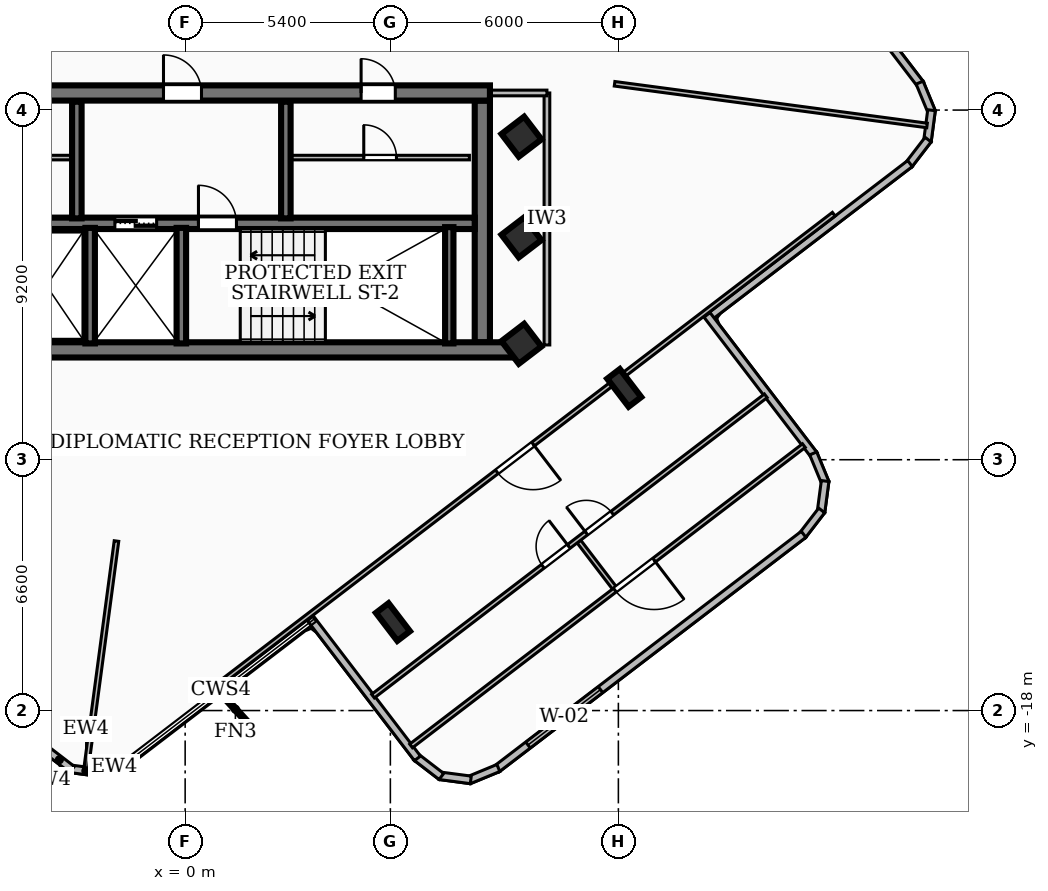
"""IFC4 building model, lengths in metres.
Left out: names, types, materials, properties, quantities, classifications, styles, units other than length and angle.
Written with IfcOpenShell. Run it as: python <this file> out.ifc"""

import sys

from ifc_helpers import new_model, si_unit, direction, frame, frame_2d, origin, origin_2d, place, context, subcontext, project, spatial, rectangle, i_section, extrude, element, fill, save


model = new_model("IFC4")
c1 = context("Model", 3, precision=1e-05, world=origin(), true_north=direction((0.0, 1.0)))
c2 = subcontext(c1, "Body", "Model", "MODEL_VIEW")
j1 = project(units=[si_unit("LENGTHUNIT", "METRE"), si_unit("PLANEANGLEUNIT", "RADIAN")], contexts=[c1])
p1 = place(None, origin())
s1 = spatial("IfcSite", under=j1, at=p1, CompositionType="ELEMENT")
p2 = place(p1, origin())
s2 = spatial("IfcBuilding", under=s1, at=p2, CompositionType="ELEMENT")
p3 = place(p2, frame((0.0, 0.0, 229.14)))
s3 = spatial("IfcBuildingStorey", under=s2, at=p3, CompositionType="ELEMENT", Elevation=229.14)
p4 = place(p3, frame((8.78, -8.51, 0.0), z_axis=(0.0, 0.0, 1.0), x_axis=(-1.0, 0.0, 0.0)))
e1 = element("IfcWall", 1, at=p4, inside=s3, PredefinedType="SHEAR", context=c2, shape_type="SweptSolid", body=[
    extrude(rectangle(XDim=17.56, YDim=0.4, at=frame_2d((8.78, 0.0))), origin(), (0.0, 0.0, 1.0), 3.14),
])
p5 = place(p3, frame((-8.02, -1.75, 0.0), z_axis=(0.0, 0.0, 1.0), x_axis=(1.0, 0.0, 0.0)))
e2 = element("IfcWall", 2, at=p5, inside=s3, PredefinedType="SHEAR", context=c2, shape_type="SweptSolid", body=[
    extrude(rectangle(XDim=16.04, YDim=0.4, at=frame_2d((8.02, 0.0))), origin(), (0.0, 0.0, 1.0), 3.14),
])
p6 = place(p5, frame((7.45, 0.0, 0.0)))
e3 = element("IfcOpeningElement", 3, at=p6, cuts=e2, PredefinedType="OPENING", context=c2, shape_type="SweptSolid", body=[
    extrude(rectangle(XDim=1.0, YDim=2.1, at=frame_2d((0.5, 1.05))), frame((0.0, 0.21, 0.0), z_axis=(0.0, -1.0, 0.0), x_axis=(1.0, 0.0, 0.0)), (0.0, 0.0, 1.0), 0.42),
])
p7 = place(p5, frame((12.65, 0.0, 0.0)))
e4 = element("IfcOpeningElement", 4, at=p7, cuts=e2, PredefinedType="OPENING", context=c2, shape_type="SweptSolid", body=[
    extrude(rectangle(XDim=0.9, YDim=2.06, at=frame_2d((0.45, 1.03))), frame((0.0, 0.21, 0.0), z_axis=(0.0, -1.0, 0.0), x_axis=(1.0, 0.0, 0.0)), (0.0, 0.0, 1.0), 0.42),
])
p8 = place(p5, frame((2.25, 0.0, 0.0)))
e5 = element("IfcOpeningElement", 5, at=p8, cuts=e2, PredefinedType="OPENING", context=c2, shape_type="SweptSolid", body=[
    extrude(rectangle(XDim=0.9, YDim=2.06, at=frame_2d((0.45, 1.03))), frame((0.0, 0.21, 0.0), z_axis=(0.0, -1.0, 0.0), x_axis=(1.0, 0.0, 0.0)), (0.0, 0.0, 1.0), 0.42),
])
p9 = place(p3, frame((7.82, -1.95, 0.0), z_axis=(0.0, 0.0, 1.0), x_axis=(0.0, -1.0, 0.0)))
e6 = element("IfcWall", 6, at=p9, inside=s3, PredefinedType="SHEAR", context=c2, shape_type="SweptSolid", body=[
    extrude(rectangle(XDim=6.36, YDim=0.4, at=frame_2d((3.18, 0.0))), origin(), (0.0, 0.0, 1.0), 3.14),
])
p10 = place(p3, frame((-7.62, -5.18, 0.0), z_axis=(0.0, 0.0, 1.0), x_axis=(1.0, 0.0, 0.0)))
e7 = element("IfcWall", 7, at=p10, inside=s3, PredefinedType="SOLIDWALL", context=c2, shape_type="SweptSolid", body=[
    extrude(rectangle(XDim=15.24, YDim=0.3, at=frame_2d((7.62, 0.0))), origin(), (0.0, 0.0, 1.0), 3.14),
])
p11 = place(p10, frame((5.77, 0.0, 0.0)))
e8 = element("IfcOpeningElement", 8, at=p11, cuts=e7, PredefinedType="OPENING", context=c2, shape_type="SweptSolid", body=[
    extrude(rectangle(XDim=1.1, YDim=2.15, at=frame_2d((0.55, 1.075))), frame((0.0, 0.16, 0.0), z_axis=(0.0, -1.0, 0.0), x_axis=(1.0, 0.0, 0.0)), (0.0, 0.0, 1.0), 0.32),
])
p12 = place(p10, frame((7.97, 0.0, 0.0)))
e9 = element("IfcOpeningElement", 9, at=p12, cuts=e7, PredefinedType="OPENING", context=c2, shape_type="SweptSolid", body=[
    extrude(rectangle(XDim=1.0, YDim=2.1, at=frame_2d((0.5, 1.05))), frame((0.0, 0.16, 0.0), z_axis=(0.0, -1.0, 0.0), x_axis=(1.0, 0.0, 0.0)), (0.0, 0.0, 1.0), 0.32),
])
p13 = place(p3, frame((6.95, -8.34, 0.0), z_axis=(0.0, 0.0, 1.0), x_axis=(0.0, 1.0, 0.0)))
e10 = element("IfcWall", 10, at=p13, inside=s3, PredefinedType="SOLIDWALL", context=c2, shape_type="SweptSolid", body=[
    extrude(rectangle(XDim=3.06, YDim=0.22, at=frame_2d((1.53, 0.0))), origin(), (0.0, 0.0, 1.0), 3.14),
])
for number, where, z_axis, x_axis in (
    (11, (-0.1, -8.34, 0.0), (0.0, 0.0, 1.0), (0.0, 1.0, 0.0)),
    (12, (-2.5, -8.34, 0.0), (0.0, 0.0, 1.0), (0.0, 1.0, 0.0)),
):
    element("IfcWall", number, at=place(p3, frame(where, z_axis=z_axis, x_axis=x_axis)), inside=s3, PredefinedType="SOLIDWALL", context=c2, shape_type="SweptSolid", body=[
        extrude(rectangle(XDim=3.04, YDim=0.25, at=frame_2d((1.52, 0.0))), origin(), (0.0, 0.0, 1.0), 3.14),
    ])
for number, where, z_axis, x_axis in (
    (13, (-2.85, -5.05, 0.0), (0.0, 0.0, 1.0), (0.0, 1.0, 0.0)),
    (14, (2.65, -5.05, 0.0), (0.0, 0.0, 1.0), (0.0, 1.0, 0.0)),
):
    element("IfcWall", number, at=place(p3, frame(where, z_axis=z_axis, x_axis=x_axis)), inside=s3, PredefinedType="SOLIDWALL", context=c2, shape_type="SweptSolid", body=[
        extrude(rectangle(XDim=3.07, YDim=0.25, at=frame_2d((1.535, 0.0))), origin(), (0.0, 0.0, 1.0), 3.14),
    ])
for number, where, z_axis, x_axis in (
    (15, (8.85, -5.55, 0.0), (0.0, 0.0, 1.0), (0.794, 0.607, 0.0)),
    (16, (8.85, -2.9, 0.0), (0.0, 0.0, 1.0), (0.794, 0.607, 0.0)),
    (17, (8.85, -8.35, 0.0), (0.0, 0.0, 1.0), (0.794, 0.607, 0.0)),
):
    element("IfcColumn", number, at=place(p3, frame(where, z_axis=z_axis, x_axis=x_axis)), inside=s3, PredefinedType="COLUMN", context=c2, shape_type="SweptSolid", body=[
        extrude(rectangle(XDim=0.75, YDim=0.75, at=origin_2d()), origin(), (0.0, 0.0, 1.0), 3.42),
    ])
for number, where, z_axis, x_axis in (
    (18, (5.468, -15.671, 0.0), (0.0, 0.0, 1.0), (0.794, 0.607, 0.0)),
    (19, (11.554, -9.51, 0.0), (0.0, 0.0, 1.0), (0.794, 0.607, 0.0)),
):
    element("IfcColumn", number, at=place(p3, frame(where, z_axis=z_axis, x_axis=x_axis)), inside=s3, PredefinedType="COLUMN", context=c2, shape_type="SweptSolid", body=[
        extrude(i_section(OverallWidth=0.418, OverallDepth=0.927, WebThickness=0.019, FlangeThickness=0.032, at=origin_2d()), origin(), (0.0, 0.0, 1.0), 3.42),
    ])
p14 = place(p3, frame((-1.478, -19.327, 0.0), z_axis=(0.0, 0.0, 1.0), x_axis=(-0.924091394431, -0.382171551451, 0.0)))
e20 = element("IfcWall", 20, at=p14, inside=s3, PredefinedType="SOLIDWALL", context=c2, shape_type="SweptSolid", body=[
    extrude(rectangle(XDim=0.837, YDim=0.2, at=frame_2d((0.419, 0.0))), origin(), (0.0, 0.0, 1.0), 3.14),
])
p15 = place(p3, frame((-2.204, -19.64, 0.0), z_axis=(0.0, 0.0, 1.0), x_axis=(-0.99140789753, 0.130806653943, 0.0)))
e21 = element("IfcWall", 21, at=p15, inside=s3, PredefinedType="SOLIDWALL", context=c2, shape_type="SweptSolid", body=[
    extrude(rectangle(XDim=0.825, YDim=0.2, at=frame_2d((0.413, 0.0))), origin(), (0.0, 0.0, 1.0), 3.14),
])
p16 = place(p3, frame((-2.977, -19.55, 0.0), z_axis=(0.0, 0.0, 1.0), x_axis=(-0.792959338773, 0.609274558022, 0.0)))
e22 = element("IfcWall", 22, at=p16, inside=s3, PredefinedType="SOLIDWALL", context=c2, shape_type="SweptSolid", body=[
    extrude(rectangle(XDim=0.839, YDim=0.2, at=frame_2d((0.419, 0.0))), origin(), (0.0, 0.0, 1.0), 3.14),
])
p17 = place(p3, frame((15.584, 3.406, 0.0), z_axis=(0.0, 0.0, 1.0), x_axis=(0.60748663121, -0.794329901805, 0.0)))
e23 = element("IfcWall", 23, at=p17, inside=s3, PredefinedType="SOLIDWALL", context=c2, shape_type="SweptSolid", body=[
    extrude(rectangle(XDim=6.203, YDim=0.2, at=frame_2d((3.101, 0.0))), origin(), (0.0, 0.0, 1.0), 3.14),
])
p18 = place(p3, frame((19.327, -1.478, 0.0), z_axis=(0.0, 0.0, 1.0), x_axis=(0.382171551451, -0.924091394431, 0.0)))
e24 = element("IfcWall", 24, at=p18, inside=s3, PredefinedType="SOLIDWALL", context=c2, shape_type="SweptSolid", body=[
    extrude(rectangle(XDim=0.837, YDim=0.2, at=frame_2d((0.419, 0.0))), origin(), (0.0, 0.0, 1.0), 3.14),
])
p19 = place(p3, frame((19.64, -2.204, 0.0), z_axis=(0.0, 0.0, 1.0), x_axis=(-0.130806653943, -0.99140789753, 0.0)))
e25 = element("IfcWall", 25, at=p19, inside=s3, PredefinedType="SOLIDWALL", context=c2, shape_type="SweptSolid", body=[
    extrude(rectangle(XDim=0.825, YDim=0.2, at=frame_2d((0.413, 0.0))), origin(), (0.0, 0.0, 1.0), 3.14),
])
p20 = place(p3, frame((19.55, -2.977, 0.0), z_axis=(0.0, 0.0, 1.0), x_axis=(-0.609274558022, -0.792959338773, 0.0)))
e26 = element("IfcWall", 26, at=p20, inside=s3, PredefinedType="SOLIDWALL", context=c2, shape_type="SweptSolid", body=[
    extrude(rectangle(XDim=0.839, YDim=0.2, at=frame_2d((0.419, 0.0))), origin(), (0.0, 0.0, 1.0), 3.14),
])
p21 = place(p3, frame((19.074, -3.607, 0.0), z_axis=(0.0, 0.0, 1.0), x_axis=(-0.794465731546, -0.607308983466, 0.0)))
e27 = element("IfcWall", 27, at=p21, inside=s3, PredefinedType="SOLIDWALL", context=c2, shape_type="SweptSolid", body=[
    extrude(rectangle(XDim=6.743, YDim=0.2, at=frame_2d((3.372, 0.0))), origin(), (0.0, 0.0, 1.0), 3.14),
])
p22 = place(p3, frame((13.732, -7.589, 0.0), z_axis=(0.0, 0.0, 1.0), x_axis=(0.607428636372, -0.794374251669, 0.0)))
e28 = element("IfcWall", 28, at=p22, inside=s3, PredefinedType="SOLIDWALL", context=c2, shape_type="SweptSolid", body=[
    extrude(rectangle(XDim=4.643, YDim=0.2, at=frame_2d((2.321, 0.0))), origin(), (0.0, 0.0, 1.0), 3.14),
])
p23 = place(p3, frame((16.527, -11.234, 0.0), z_axis=(0.0, 0.0, 1.0), x_axis=(0.381408676087, -0.924406524104, 0.0)))
e29 = element("IfcWall", 29, at=p23, inside=s3, PredefinedType="SOLIDWALL", context=c2, shape_type="SweptSolid", body=[
    extrude(rectangle(XDim=0.839, YDim=0.2, at=frame_2d((0.419, 0.0))), origin(), (0.0, 0.0, 1.0), 3.14),
])
p24 = place(p3, frame((16.84, -11.961, 0.0), z_axis=(0.0, 0.0, 1.0), x_axis=(-0.131059066172, -0.991374561492, 0.0)))
e30 = element("IfcWall", 30, at=p24, inside=s3, PredefinedType="SOLIDWALL", context=c2, shape_type="SweptSolid", body=[
    extrude(rectangle(XDim=0.825, YDim=0.2, at=frame_2d((0.413, 0.0))), origin(), (0.0, 0.0, 1.0), 3.14),
])
p25 = place(p3, frame((16.75, -12.734, 0.0), z_axis=(0.0, 0.0, 1.0), x_axis=(-0.609837482774, -0.792526494575, 0.0)))
e31 = element("IfcWall", 31, at=p25, inside=s3, PredefinedType="SOLIDWALL", context=c2, shape_type="SweptSolid", body=[
    extrude(rectangle(XDim=0.838, YDim=0.2, at=frame_2d((0.419, 0.0))), origin(), (0.0, 0.0, 1.0), 3.14),
])
p26 = place(p3, frame((16.274, -13.363, 0.0), z_axis=(0.0, 0.0, 1.0), x_axis=(-0.794458044917, -0.607319038781, 0.0)))
e32 = element("IfcWall", 32, at=p26, inside=s3, PredefinedType="SOLIDWALL", context=c2, shape_type="SweptSolid", body=[
    extrude(rectangle(XDim=10.164, YDim=0.2, at=frame_2d((5.082, 0.0))), origin(), (0.0, 0.0, 1.0), 3.14),
])
p27 = place(p26, frame((6.728, 0.0, 0.85)))
e33 = element("IfcOpeningElement", 33, at=p27, cuts=e32, PredefinedType="OPENING", context=c2, shape_type="SweptSolid", body=[
    extrude(rectangle(XDim=2.4, YDim=2.1, at=frame_2d((1.2, 1.05))), frame((0.0, 0.11, 0.0), z_axis=(0.0, -1.0, 0.0), x_axis=(1.0, 0.0, 0.0)), (0.0, 0.0, 1.0), 0.22),
])
p28 = place(p3, frame((8.242, -19.511, 0.0), z_axis=(0.0, 0.0, 1.0), x_axis=(-0.924091394431, -0.382171551451, 0.0)))
e34 = element("IfcWall", 34, at=p28, inside=s3, PredefinedType="SOLIDWALL", context=c2, shape_type="SweptSolid", body=[
    extrude(rectangle(XDim=0.837, YDim=0.2, at=frame_2d((0.419, 0.0))), origin(), (0.0, 0.0, 1.0), 3.14),
])
p29 = place(p3, frame((7.516, -19.824, 0.0), z_axis=(0.0, 0.0, 1.0), x_axis=(-0.991412958994, 0.130768286444, 0.0)))
e35 = element("IfcWall", 35, at=p29, inside=s3, PredefinedType="SOLIDWALL", context=c2, shape_type="SweptSolid", body=[
    extrude(rectangle(XDim=0.825, YDim=0.2, at=frame_2d((0.413, 0.0))), origin(), (0.0, 0.0, 1.0), 3.14),
])
p30 = place(p3, frame((6.743, -19.734, 0.0), z_axis=(0.0, 0.0, 1.0), x_axis=(-0.792959338773, 0.609274558022, 0.0)))
e36 = element("IfcWall", 36, at=p30, inside=s3, PredefinedType="SOLIDWALL", context=c2, shape_type="SweptSolid", body=[
    extrude(rectangle(XDim=0.839, YDim=0.2, at=frame_2d((0.419, 0.0))), origin(), (0.0, 0.0, 1.0), 3.14),
])
p31 = place(p3, frame((6.113, -19.258, 0.0), z_axis=(0.0, 0.0, 1.0), x_axis=(-0.607327150699, 0.794451843741, 0.0)))
e37 = element("IfcWall", 37, at=p31, inside=s3, PredefinedType="SOLIDWALL", context=c2, shape_type="SweptSolid", body=[
    extrude(rectangle(XDim=4.643, YDim=0.2, at=frame_2d((2.322, 0.0))), origin(), (0.0, 0.0, 1.0), 3.14),
])
p32 = place(p3, frame((2.8, -3.45, 0.0), z_axis=(0.0, 0.0, 1.0), x_axis=(1.0, 0.0, 0.0)))
e38 = element("IfcWall", 38, at=p32, inside=s3, PredefinedType="PARTITIONING", context=c2, shape_type="SweptSolid", body=[
    extrude(rectangle(XDim=4.68, YDim=0.12, at=frame_2d((2.34, 0.0))), origin(), (0.0, 0.0, 1.0), 3.14),
])
p33 = place(p32, frame((1.9, 0.0, 0.0)))
e39 = element("IfcOpeningElement", 39, at=p33, cuts=e38, PredefinedType="OPENING", context=c2, shape_type="SweptSolid", body=[
    extrude(rectangle(XDim=0.86, YDim=2.04, at=frame_2d((0.43, 1.02))), frame((0.0, 0.07, 0.0), z_axis=(0.0, -1.0, 0.0), x_axis=(1.0, 0.0, 0.0)), (0.0, 0.0, 1.0), 0.14),
])
p34 = place(p3, frame((-7.52, -3.45, 0.0), z_axis=(0.0, 0.0, 1.0), x_axis=(1.0, 0.0, 0.0)))
e40 = element("IfcWall", 40, at=p34, inside=s3, PredefinedType="PARTITIONING", context=c2, shape_type="SweptSolid", body=[
    extrude(rectangle(XDim=4.54, YDim=0.12, at=frame_2d((2.27, 0.0))), origin(), (0.0, 0.0, 1.0), 3.14),
])
p35 = place(p34, frame((1.84, 0.0, 0.0)))
e41 = element("IfcOpeningElement", 41, at=p35, cuts=e40, PredefinedType="OPENING", context=c2, shape_type="SweptSolid", body=[
    extrude(rectangle(XDim=0.86, YDim=2.04, at=frame_2d((0.43, 1.02))), frame((0.0, 0.07, 0.0), z_axis=(0.0, -1.0, 0.0), x_axis=(1.0, 0.0, 0.0)), (0.0, 0.0, 1.0), 0.14),
])
p36 = place(p3, frame((9.52, -8.38, 0.0), z_axis=(0.0, 0.0, 1.0), x_axis=(0.0, 1.0, 0.0)))
e42 = element("IfcWall", 42, at=p36, inside=s3, PredefinedType="PARTITIONING", context=c2, shape_type="SweptSolid", body=[
    extrude(rectangle(XDim=6.63, YDim=0.15, at=frame_2d((3.315, 0.0))), origin(), (0.0, 0.0, 1.0), 3.14),
])
p37 = place(p3, frame((7.85, -1.75, 0.0), z_axis=(0.0, 0.0, 1.0), x_axis=(1.0, 0.0, 0.0)))
e43 = element("IfcWall", 43, at=p37, inside=s3, PredefinedType="PARTITIONING", context=c2, shape_type="SweptSolid", body=[
    extrude(rectangle(XDim=1.67, YDim=0.15, at=frame_2d((0.835, 0.0))), origin(), (0.0, 0.0, 1.0), 2.37),
])
p38 = place(p3, frame((-1.807, -13.54, 0.0), z_axis=(0.0, 0.0, 1.0), x_axis=(-0.132245865303, -0.991216944523, 0.0)))
e44 = element("IfcWall", 44, at=p38, inside=s3, PredefinedType="PARTITIONING", context=c2, shape_type="SweptSolid", body=[
    extrude(rectangle(XDim=6.035, YDim=0.12, at=frame_2d((3.018, 0.0))), origin(), (0.0, 0.0, 1.0), 3.14),
])
p39 = place(p3, frame((11.3, -1.508, 0.0), z_axis=(0.0, 0.0, 1.0), x_axis=(0.99121735818, -0.132242764804, 0.0)))
e45 = element("IfcWall", 45, at=p39, inside=s3, PredefinedType="PARTITIONING", context=c2, shape_type="SweptSolid", body=[
    extrude(rectangle(XDim=8.295, YDim=0.12, at=frame_2d((4.147, 0.0))), origin(), (0.0, 0.0, 1.0), 3.14),
])
p40 = place(p3, frame((17.068, -4.939, 0.0), z_axis=(0.0, 0.0, 1.0), x_axis=(-0.794433927634, -0.607350586255, 0.0)))
e46 = element("IfcWall", 46, at=p40, inside=s3, PredefinedType="PARTITIONING", context=c2, shape_type="SweptSolid", body=[
    extrude(rectangle(XDim=20.58, YDim=0.12, at=frame_2d((10.29, 0.0))), origin(), (0.0, 0.0, 1.0), 2.51),
])
p41 = place(p40, frame((9.96, 0.0, 0.0)))
e47 = element("IfcOpeningElement", 47, at=p41, cuts=e46, PredefinedType="OPENING", context=c2, shape_type="SweptSolid", body=[
    extrude(rectangle(XDim=1.2, YDim=2.1, at=frame_2d((0.6, 1.05))), frame((0.0, 0.07, 0.0), z_axis=(0.0, -1.0, 0.0), x_axis=(1.0, 0.0, 0.0)), (0.0, 0.0, 1.0), 0.14),
])
p42 = place(p3, frame((10.362, -13.553, 0.0), z_axis=(0.0, 0.0, 1.0), x_axis=(0.6073553069, -0.794430318644, 0.0)))
e48 = element("IfcWall", 48, at=p42, inside=s3, PredefinedType="PARTITIONING", context=c2, shape_type="SweptSolid", body=[
    extrude(rectangle(XDim=1.53, YDim=0.12, at=frame_2d((0.765, 0.0))), origin(), (0.0, 0.0, 1.0), 3.14),
])
p43 = place(p3, frame((4.943, -17.62, 0.0), z_axis=(0.0, 0.0, 1.0), x_axis=(0.79442653656, 0.607360253893, 0.0)))
e49 = element("IfcWall", 49, at=p43, inside=s3, PredefinedType="PARTITIONING", context=c2, shape_type="SweptSolid", body=[
    extrude(rectangle(XDim=13.01, YDim=0.12, at=frame_2d((6.505, 0.0))), origin(), (0.0, 0.0, 1.0), 3.14),
])
p44 = place(p43, frame((5.625, 0.0, 0.0)))
e50 = element("IfcOpeningElement", 50, at=p44, cuts=e49, PredefinedType="OPENING", context=c2, shape_type="SweptSolid", body=[
    extrude(rectangle(XDim=0.86, YDim=2.04, at=frame_2d((0.43, 1.02))), frame((0.0, 0.07, 0.0), z_axis=(0.0, -1.0, 0.0), x_axis=(1.0, 0.0, 0.0)), (0.0, 0.0, 1.0), 0.14),
])
p45 = place(p43, frame((7.065, 0.0, 0.0)))
e51 = element("IfcOpeningElement", 51, at=p45, cuts=e49, PredefinedType="OPENING", context=c2, shape_type="SweptSolid", body=[
    extrude(rectangle(XDim=0.86, YDim=2.04, at=frame_2d((0.43, 1.02))), frame((0.0, 0.07, 0.0), z_axis=(0.0, -1.0, 0.0), x_axis=(1.0, 0.0, 0.0)), (0.0, 0.0, 1.0), 0.14),
])
p46 = place(p3, frame((16.281, -11.029, 0.0), z_axis=(0.0, 0.0, 1.0), x_axis=(-0.794435590649, -0.607348410973, 0.0)))
e52 = element("IfcWall", 52, at=p46, inside=s3, PredefinedType="PARTITIONING", context=c2, shape_type="SweptSolid", body=[
    extrude(rectangle(XDim=13.01, YDim=0.12, at=frame_2d((6.505, 0.0))), origin(), (0.0, 0.0, 1.0), 3.14),
])
p47 = place(p46, frame((4.96, 0.0, 0.0)))
e53 = element("IfcOpeningElement", 53, at=p47, cuts=e52, PredefinedType="OPENING", context=c2, shape_type="SweptSolid", body=[
    extrude(rectangle(XDim=1.3, YDim=2.1, at=frame_2d((0.65, 1.05))), frame((0.0, 0.07, 0.0), z_axis=(0.0, -1.0, 0.0), x_axis=(1.0, 0.0, 0.0)), (0.0, 0.0, 1.0), 0.14),
])
p48 = place(p27, origin())
e54 = element("IfcWindow", 54, at=p48, inside=s3, PartitioningType="SINGLE_PANEL", PredefinedType="WINDOW", context=c2, shape_type="SweptSolid", body=[
    extrude(rectangle(XDim=2.4, YDim=2.1, at=frame_2d((1.2, 1.05))), frame((0.0, 0.03, 0.0), z_axis=(0.0, -1.0, 0.0), x_axis=(1.0, 0.0, 0.0)), (0.0, 0.0, 1.0), 0.06),
])
fill(e33, e54)
p49 = place(p6, origin())
e55 = element("IfcDoor", 55, at=p49, inside=s3, OperationType="SINGLE_SWING_LEFT", PredefinedType="DOOR", context=c2, shape_type="SweptSolid", body=[
    extrude(rectangle(XDim=1.0, YDim=2.1, at=frame_2d((0.5, 1.05))), frame((0.0, 0.025, 0.0), z_axis=(0.0, -1.0, 0.0), x_axis=(1.0, 0.0, 0.0)), (0.0, 0.0, 1.0), 0.05),
])
fill(e3, e55)
p50 = place(p11, origin())
e56 = element("IfcDoor", 56, at=p50, inside=s3, OperationType="DOUBLE_DOOR_SLIDING", PredefinedType="DOOR", context=c2, shape_type="SweptSolid", body=[
    extrude(rectangle(XDim=1.1, YDim=2.15, at=frame_2d((0.55, 1.075))), frame((0.0, 0.025, 0.0), z_axis=(0.0, -1.0, 0.0), x_axis=(1.0, 0.0, 0.0)), (0.0, 0.0, 1.0), 0.05),
])
fill(e8, e56)
p51 = place(p12, origin())
e57 = element("IfcDoor", 57, at=p51, inside=s3, OperationType="SINGLE_SWING_LEFT", PredefinedType="DOOR", context=c2, shape_type="SweptSolid", body=[
    extrude(rectangle(XDim=1.0, YDim=2.1, at=frame_2d((0.5, 1.05))), frame((0.0, 0.025, 0.0), z_axis=(0.0, -1.0, 0.0), x_axis=(1.0, 0.0, 0.0)), (0.0, 0.0, 1.0), 0.05),
])
fill(e9, e57)
p52 = place(p7, origin())
e58 = element("IfcDoor", 58, at=p52, inside=s3, OperationType="SINGLE_SWING_LEFT", PredefinedType="DOOR", context=c2, shape_type="SweptSolid", body=[
    extrude(rectangle(XDim=0.9, YDim=2.06, at=frame_2d((0.45, 1.03))), frame((0.0, 0.025, 0.0), z_axis=(0.0, -1.0, 0.0), x_axis=(1.0, 0.0, 0.0)), (0.0, 0.0, 1.0), 0.05),
])
fill(e4, e58)
p53 = place(p33, origin())
e59 = element("IfcDoor", 59, at=p53, inside=s3, OperationType="SINGLE_SWING_LEFT", PredefinedType="DOOR", context=c2, shape_type="SweptSolid", body=[
    extrude(rectangle(XDim=0.86, YDim=2.04, at=frame_2d((0.43, 1.02))), frame((0.0, 0.025, 0.0), z_axis=(0.0, -1.0, 0.0), x_axis=(1.0, 0.0, 0.0)), (0.0, 0.0, 1.0), 0.05),
])
fill(e39, e59)
p54 = place(p41, origin())
e60 = element("IfcDoor", 60, at=p54, inside=s3, OperationType="SINGLE_SWING_LEFT", PredefinedType="DOOR", context=c2, shape_type="SweptSolid", body=[
    extrude(rectangle(XDim=1.2, YDim=2.1, at=frame_2d((0.6, 1.05))), frame((0.0, 0.025, 0.0), z_axis=(0.0, -1.0, 0.0), x_axis=(1.0, 0.0, 0.0)), (0.0, 0.0, 1.0), 0.05),
])
fill(e47, e60)
p55 = place(p44, origin())
e61 = element("IfcDoor", 61, at=p55, inside=s3, OperationType="SINGLE_SWING_RIGHT", PredefinedType="DOOR", context=c2, shape_type="SweptSolid", body=[
    extrude(rectangle(XDim=0.86, YDim=2.04, at=frame_2d((0.43, 1.02))), frame((0.0, 0.025, 0.0), z_axis=(0.0, -1.0, 0.0), x_axis=(1.0, 0.0, 0.0)), (0.0, 0.0, 1.0), 0.05),
])
fill(e50, e61)
p56 = place(p45, origin())
e62 = element("IfcDoor", 62, at=p56, inside=s3, OperationType="SINGLE_SWING_LEFT", PredefinedType="DOOR", context=c2, shape_type="SweptSolid", body=[
    extrude(rectangle(XDim=0.86, YDim=2.04, at=frame_2d((0.43, 1.02))), frame((0.0, 0.025, 0.0), z_axis=(0.0, -1.0, 0.0), x_axis=(1.0, 0.0, 0.0)), (0.0, 0.0, 1.0), 0.05),
])
fill(e51, e62)
p57 = place(p47, origin())
e63 = element("IfcDoor", 63, at=p57, inside=s3, OperationType="SINGLE_SWING_LEFT", PredefinedType="DOOR", context=c2, shape_type="SweptSolid", body=[
    extrude(rectangle(XDim=1.3, YDim=2.1, at=frame_2d((0.65, 1.05))), frame((0.0, 0.025, 0.0), z_axis=(0.0, -1.0, 0.0), x_axis=(1.0, 0.0, 0.0)), (0.0, 0.0, 1.0), 0.05),
])
fill(e53, e63)
save(model, sys.argv[1])
